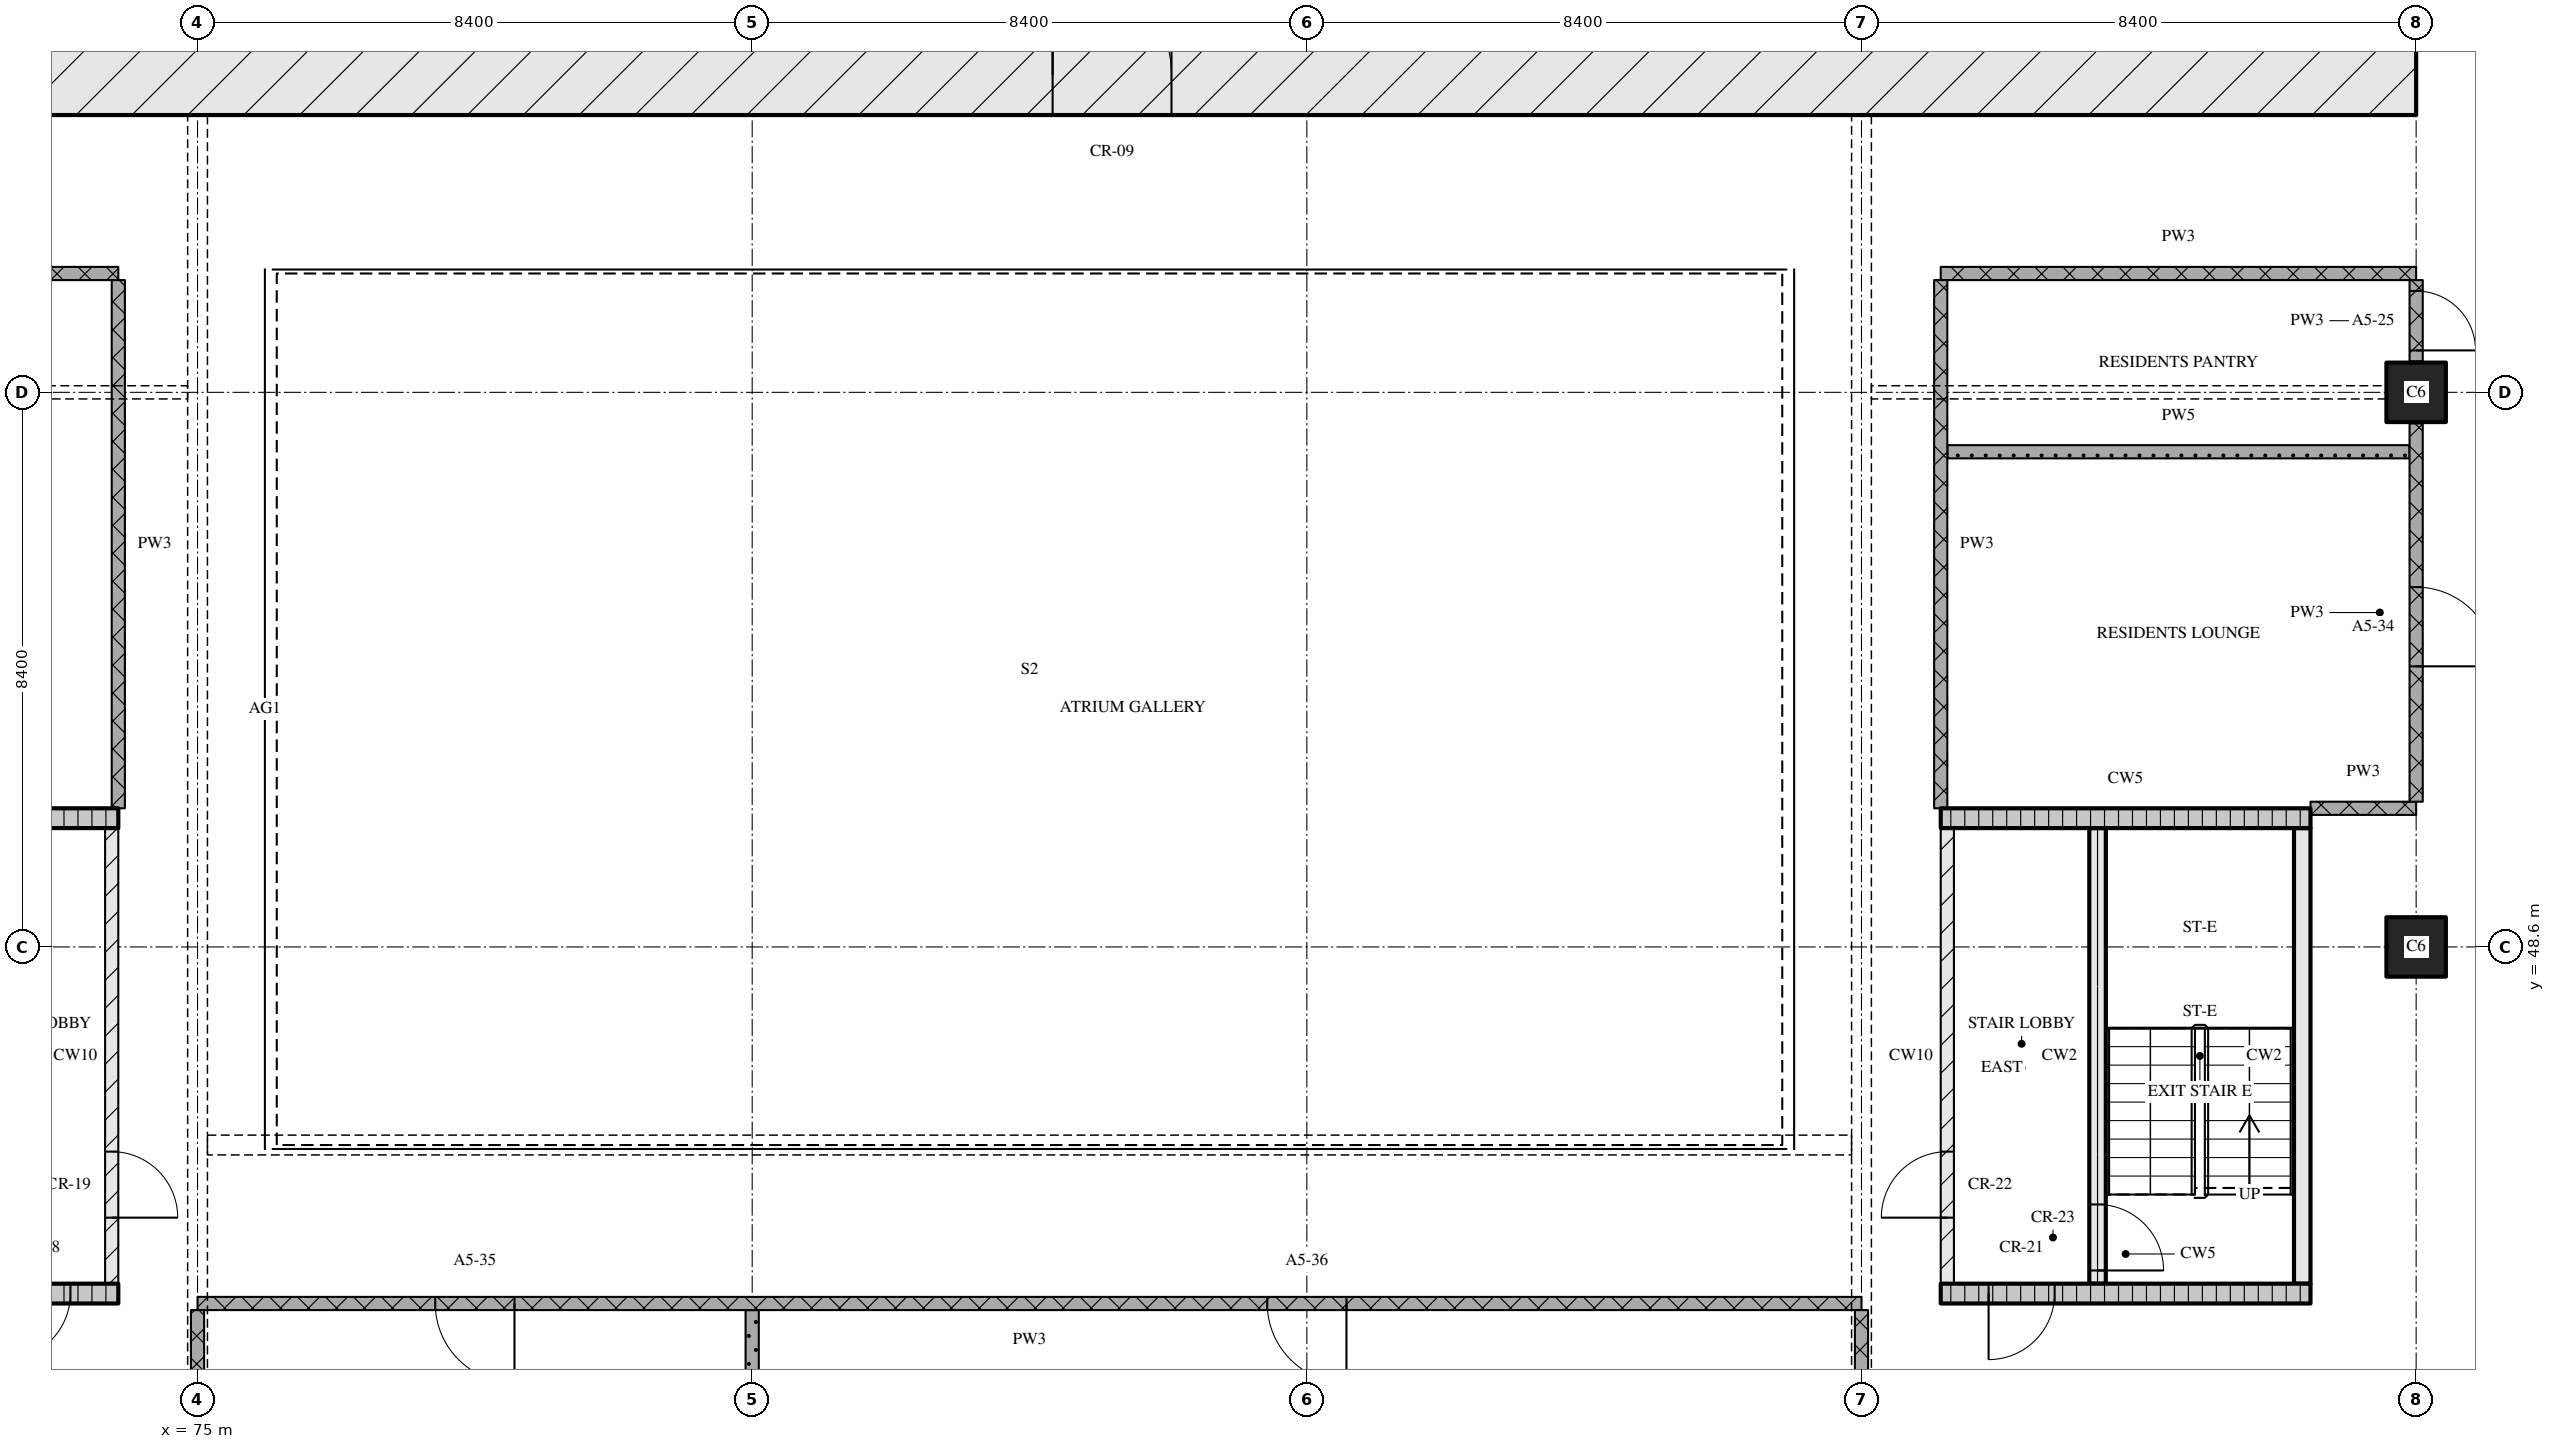
"""IFC4 building model, lengths in metres.
Left out: names, types, materials, properties, quantities, classifications, styles, units other than length and angle.
Written with IfcOpenShell. Run it as: python <this file> out.ifc"""

import sys

from ifc_helpers import new_model, si_unit, direction, frame, frame_2d, origin, origin_2d, place, context, subcontext, project, spatial, rectangle, extrude, element, fill, save


model = new_model("IFC4")
c1 = context("Model", 3, precision=1e-05, world=origin(), true_north=direction((0.0, 1.0)))
c2 = subcontext(c1, "Body", "Model", "MODEL_VIEW")
j1 = project(units=[si_unit("LENGTHUNIT", "METRE"), si_unit("PLANEANGLEUNIT", "RADIAN")], contexts=[c1])
p1 = place(None, origin())
s1 = spatial("IfcSite", under=j1, at=p1, CompositionType="ELEMENT")
p2 = place(p1, origin())
s2 = spatial("IfcBuilding", under=s1, at=p2, CompositionType="ELEMENT")
p3 = place(p2, frame((0.0, 0.0, 80.4)))
s3 = spatial("IfcBuildingStorey", under=s2, at=p3, CompositionType="ELEMENT", Elevation=80.4)
for number, where, z_axis, x_axis in (
    (1, (108.6, 48.6, 0.0), (0.0, 0.0, 1.0), (1.0, 0.0, 0.0)),
    (2, (108.6, 57.0, 0.0), (0.0, 0.0, 1.0), (1.0, 0.0, 0.0)),
):
    element("IfcColumn", number, at=place(p3, frame(where, z_axis=z_axis, x_axis=x_axis)), inside=s3, PredefinedType="COLUMN", context=c2, shape_type="SweptSolid", body=[
        extrude(rectangle(XDim=0.9, YDim=0.9, at=origin_2d()), origin(), (0.0, 0.0, 1.0), 3.6),
    ])
p4 = place(p3, frame((66.6, 61.8, 0.0), z_axis=(0.0, 0.0, 1.0), x_axis=(1.0, 0.0, 0.0)))
e3 = element("IfcWall", 3, at=p4, inside=s3, PredefinedType="SOLIDWALL", context=c2, shape_type="SweptSolid", body=[
    extrude(rectangle(XDim=42.0, YDim=1.2, at=frame_2d((21.0, 0.0))), origin(), (0.0, 0.0, 1.0), 3.3),
])
p5 = place(p4, frame((21.35, 0.0, 0.0)))
e4 = element("IfcOpeningElement", 4, at=p5, cuts=e3, PredefinedType="OPENING", context=c2, shape_type="SweptSolid", body=[
    extrude(rectangle(XDim=1.8, YDim=2.1, at=frame_2d((0.9, 1.05))), frame((0.0, 0.61, 0.0), z_axis=(0.0, -1.0, 0.0), x_axis=(1.0, 0.0, 0.0)), (0.0, 0.0, 1.0), 1.22),
])
p6 = place(p3, frame((68.2, 43.35, 0.0), z_axis=(0.0, 0.0, 1.0), x_axis=(1.0, 0.0, 0.0)))
e5 = element("IfcWall", 5, at=p6, inside=s3, PredefinedType="SOLIDWALL", context=c2, shape_type="SweptSolid", body=[
    extrude(rectangle(XDim=5.6, YDim=0.3, at=frame_2d((2.8, 0.0))), origin(), (0.0, 0.0, 1.0), 3.3),
])
p7 = place(p6, frame((3.875, 0.0, 0.0)))
e6 = element("IfcOpeningElement", 6, at=p7, cuts=e5, PredefinedType="OPENING", context=c2, shape_type="SweptSolid", body=[
    extrude(rectangle(XDim=1.0, YDim=2.1, at=frame_2d((0.5, 1.05))), frame((0.0, 0.16, 0.0), z_axis=(0.0, -1.0, 0.0), x_axis=(1.0, 0.0, 0.0)), (0.0, 0.0, 1.0), 0.32),
])
p8 = place(p3, frame((73.7, 43.5, 0.0), z_axis=(0.0, 0.0, 1.0), x_axis=(0.0, 1.0, 0.0)))
e7 = element("IfcWall", 7, at=p8, inside=s3, PredefinedType="PARTITIONING", context=c2, shape_type="SweptSolid", body=[
    extrude(rectangle(XDim=6.9, YDim=0.2, at=frame_2d((3.45, 0.0))), origin(), (0.0, 0.0, 1.0), 3.3),
])
p9 = place(p8, frame((1.0, 0.0, 0.0)))
e8 = element("IfcOpeningElement", 8, at=p9, cuts=e7, PredefinedType="OPENING", context=c2, shape_type="SweptSolid", body=[
    extrude(rectangle(XDim=1.0, YDim=2.1, at=frame_2d((0.5, 1.05))), frame((0.0, 0.11, 0.0), z_axis=(0.0, -1.0, 0.0), x_axis=(1.0, 0.0, 0.0)), (0.0, 0.0, 1.0), 0.22),
])
p10 = place(p3, frame((68.2, 50.55, 0.0), z_axis=(0.0, 0.0, 1.0), x_axis=(1.0, 0.0, 0.0)))
e9 = element("IfcWall", 9, at=p10, inside=s3, PredefinedType="SOLIDWALL", context=c2, shape_type="SweptSolid", body=[
    extrude(rectangle(XDim=5.6, YDim=0.3, at=frame_2d((2.8, 0.0))), origin(), (0.0, 0.0, 1.0), 3.3),
])
p11 = place(p3, frame((101.4, 43.35, 0.0), z_axis=(0.0, 0.0, 1.0), x_axis=(1.0, 0.0, 0.0)))
e10 = element("IfcWall", 10, at=p11, inside=s3, PredefinedType="SOLIDWALL", context=c2, shape_type="SweptSolid", body=[
    extrude(rectangle(XDim=5.6, YDim=0.3, at=frame_2d((2.8, 0.0))), origin(), (0.0, 0.0, 1.0), 3.3),
])
p12 = place(p11, frame((0.725, 0.0, 0.0)))
e11 = element("IfcOpeningElement", 11, at=p12, cuts=e10, PredefinedType="OPENING", context=c2, shape_type="SweptSolid", body=[
    extrude(rectangle(XDim=1.0, YDim=2.1, at=frame_2d((0.5, 1.05))), frame((0.0, 0.16, 0.0), z_axis=(0.0, -1.0, 0.0), x_axis=(1.0, 0.0, 0.0)), (0.0, 0.0, 1.0), 0.32),
])
p13 = place(p3, frame((101.5, 43.5, 0.0), z_axis=(0.0, 0.0, 1.0), x_axis=(0.0, 1.0, 0.0)))
e12 = element("IfcWall", 12, at=p13, inside=s3, PredefinedType="PARTITIONING", context=c2, shape_type="SweptSolid", body=[
    extrude(rectangle(XDim=6.9, YDim=0.2, at=frame_2d((3.45, 0.0))), origin(), (0.0, 0.0, 1.0), 3.3),
])
p14 = place(p13, frame((1.0, 0.0, 0.0)))
e13 = element("IfcOpeningElement", 13, at=p14, cuts=e12, PredefinedType="OPENING", context=c2, shape_type="SweptSolid", body=[
    extrude(rectangle(XDim=1.0, YDim=2.1, at=frame_2d((0.5, 1.05))), frame((0.0, 0.11, 0.0), z_axis=(0.0, -1.0, 0.0), x_axis=(1.0, 0.0, 0.0)), (0.0, 0.0, 1.0), 0.22),
])
p15 = place(p3, frame((103.775, 43.5, 0.0), z_axis=(0.0, 0.0, 1.0), x_axis=(0.0, 1.0, 0.0)))
e14 = element("IfcWall", 14, at=p15, inside=s3, PredefinedType="SOLIDWALL", context=c2, shape_type="SweptSolid", body=[
    extrude(rectangle(XDim=6.9, YDim=0.25, at=frame_2d((3.45, 0.0))), origin(), (0.0, 0.0, 1.0), 3.3),
])
p16 = place(p15, frame((0.2, 0.0, 0.0)))
e15 = element("IfcOpeningElement", 15, at=p16, cuts=e14, PredefinedType="OPENING", context=c2, shape_type="SweptSolid", body=[
    extrude(rectangle(XDim=1.0, YDim=2.1, at=frame_2d((0.5, 1.05))), frame((0.0, 0.135, 0.0), z_axis=(0.0, -1.0, 0.0), x_axis=(1.0, 0.0, 0.0)), (0.0, 0.0, 1.0), 0.27),
])
p17 = place(p3, frame((106.875, 43.5, 0.0), z_axis=(0.0, 0.0, 1.0), x_axis=(0.0, 1.0, 0.0)))
e16 = element("IfcWall", 16, at=p17, inside=s3, PredefinedType="SOLIDWALL", context=c2, shape_type="SweptSolid", body=[
    extrude(rectangle(XDim=6.9, YDim=0.25, at=frame_2d((3.45, 0.0))), origin(), (0.0, 0.0, 1.0), 3.3),
])
p18 = place(p3, frame((101.4, 50.55, 0.0), z_axis=(0.0, 0.0, 1.0), x_axis=(1.0, 0.0, 0.0)))
e17 = element("IfcWall", 17, at=p18, inside=s3, PredefinedType="SOLIDWALL", context=c2, shape_type="SweptSolid", body=[
    extrude(rectangle(XDim=5.6, YDim=0.3, at=frame_2d((2.8, 0.0))), origin(), (0.0, 0.0, 1.0), 3.3),
])
p19 = place(p3, frame((100.2, 43.2, 0.0), z_axis=(0.0, 0.0, 1.0), x_axis=(-1.0, 0.0, 0.0)))
e18 = element("IfcWall", 18, at=p19, inside=s3, PredefinedType="PARTITIONING", context=c2, shape_type="SweptSolid", body=[
    extrude(rectangle(XDim=25.2, YDim=0.2, at=frame_2d((12.6, 0.0))), origin(), (0.0, 0.0, 1.0), 3.3),
])
p20 = place(p19, frame((7.8, 0.0, 0.0)))
e19 = element("IfcOpeningElement", 19, at=p20, cuts=e18, PredefinedType="OPENING", context=c2, shape_type="SweptSolid", body=[
    extrude(rectangle(XDim=1.2, YDim=2.1, at=frame_2d((0.6, 1.05))), frame((0.0, 0.11, 0.0), z_axis=(0.0, -1.0, 0.0), x_axis=(1.0, 0.0, 0.0)), (0.0, 0.0, 1.0), 0.22),
])
p21 = place(p19, frame((20.4, 0.0, 0.0)))
e20 = element("IfcOpeningElement", 20, at=p21, cuts=e18, PredefinedType="OPENING", context=c2, shape_type="SweptSolid", body=[
    extrude(rectangle(XDim=1.2, YDim=2.1, at=frame_2d((0.6, 1.05))), frame((0.0, 0.11, 0.0), z_axis=(0.0, -1.0, 0.0), x_axis=(1.0, 0.0, 0.0)), (0.0, 0.0, 1.0), 0.22),
])
p22 = place(p3, frame((107.0, 50.7, 0.0), z_axis=(0.0, 0.0, 1.0), x_axis=(1.0, 0.0, 0.0)))
e21 = element("IfcWall", 21, at=p22, inside=s3, PredefinedType="PARTITIONING", context=c2, shape_type="SweptSolid", body=[
    extrude(rectangle(XDim=1.6, YDim=0.2, at=frame_2d((0.8, 0.0))), origin(), (0.0, 0.0, 1.0), 3.3),
])
p23 = place(p3, frame((101.5, 56.1, 0.0), z_axis=(0.0, 0.0, 1.0), x_axis=(1.0, 0.0, 0.0)))
e22 = element("IfcWall", 22, at=p23, inside=s3, PredefinedType="PARTITIONING", context=c2, shape_type="SweptSolid", body=[
    extrude(rectangle(XDim=7.0, YDim=0.2, at=frame_2d((3.5, 0.0))), origin(), (0.0, 0.0, 1.0), 3.3),
])
p24 = place(p3, frame((73.8, 58.8, 0.0), z_axis=(0.0, 0.0, 1.0), x_axis=(-1.0, 0.0, 0.0)))
e23 = element("IfcWall", 23, at=p24, inside=s3, PredefinedType="PARTITIONING", context=c2, shape_type="SweptSolid", body=[
    extrude(rectangle(XDim=7.2, YDim=0.2, at=frame_2d((3.6, 0.0))), origin(), (0.0, 0.0, 1.0), 3.3),
])
p25 = place(p24, frame((3.0, 0.0, 0.0)))
e24 = element("IfcOpeningElement", 24, at=p25, cuts=e23, PredefinedType="OPENING", context=c2, shape_type="SweptSolid", body=[
    extrude(rectangle(XDim=1.2, YDim=2.1, at=frame_2d((0.6, 1.05))), frame((0.0, 0.11, 0.0), z_axis=(0.0, -1.0, 0.0), x_axis=(1.0, 0.0, 0.0)), (0.0, 0.0, 1.0), 0.22),
])
p26 = place(p3, frame((101.4, 58.8, 0.0), z_axis=(0.0, 0.0, 1.0), x_axis=(1.0, 0.0, 0.0)))
e25 = element("IfcWall", 25, at=p26, inside=s3, PredefinedType="PARTITIONING", context=c2, shape_type="SweptSolid", body=[
    extrude(rectangle(XDim=7.2, YDim=0.2, at=frame_2d((3.6, 0.0))), origin(), (0.0, 0.0, 1.0), 3.3),
])
p27 = place(p3, frame((73.8, 58.7, 0.0), z_axis=(0.0, 0.0, 1.0), x_axis=(0.0, -1.0, 0.0)))
e26 = element("IfcWall", 26, at=p27, inside=s3, PredefinedType="PARTITIONING", context=c2, shape_type="SweptSolid", body=[
    extrude(rectangle(XDim=8.0, YDim=0.2, at=frame_2d((4.0, 0.0))), origin(), (0.0, 0.0, 1.0), 3.3),
])
p28 = place(p3, frame((75.0, 43.1, 0.0), z_axis=(0.0, 0.0, 1.0), x_axis=(0.0, -1.0, 0.0)))
e27 = element("IfcWall", 27, at=p28, inside=s3, PredefinedType="PARTITIONING", context=c2, shape_type="SweptSolid", body=[
    extrude(rectangle(XDim=2.2, YDim=0.2, at=frame_2d((1.1, 0.0))), origin(), (0.0, 0.0, 1.0), 2.41),
])
p29 = place(p3, frame((83.4, 43.1, 0.0), z_axis=(0.0, 0.0, 1.0), x_axis=(0.0, -1.0, 0.0)))
e28 = element("IfcWall", 28, at=p29, inside=s3, PredefinedType="PARTITIONING", context=c2, shape_type="SweptSolid", body=[
    extrude(rectangle(XDim=2.43, YDim=0.2, at=frame_2d((1.215, 0.0))), origin(), (0.0, 0.0, 1.0), 3.3),
])
p30 = place(p3, frame((100.2, 43.1, 0.0), z_axis=(0.0, 0.0, 1.0), x_axis=(0.0, -1.0, 0.0)))
e29 = element("IfcWall", 29, at=p30, inside=s3, PredefinedType="PARTITIONING", context=c2, shape_type="SweptSolid", body=[
    extrude(rectangle(XDim=2.2, YDim=0.2, at=frame_2d((1.1, 0.0))), origin(), (0.0, 0.0, 1.0), 2.41),
])
p31 = place(p3, frame((101.4, 58.7, 0.0), z_axis=(0.0, 0.0, 1.0), x_axis=(0.0, -1.0, 0.0)))
e30 = element("IfcWall", 30, at=p31, inside=s3, PredefinedType="PARTITIONING", context=c2, shape_type="SweptSolid", body=[
    extrude(rectangle(XDim=8.0, YDim=0.2, at=frame_2d((4.0, 0.0))), origin(), (0.0, 0.0, 1.0), 3.3),
])
p32 = place(p3, frame((108.6, 50.8, 0.0), z_axis=(0.0, 0.0, 1.0), x_axis=(0.0, 1.0, 0.0)))
e31 = element("IfcWall", 31, at=p32, inside=s3, PredefinedType="PARTITIONING", context=c2, shape_type="SweptSolid", body=[
    extrude(rectangle(XDim=5.73, YDim=0.2, at=frame_2d((2.865, 0.0))), origin(), (0.0, 0.0, 1.0), 3.3),
])
p33 = place(p32, frame((2.05, 0.0, 0.0)))
e32 = element("IfcOpeningElement", 32, at=p33, cuts=e31, PredefinedType="OPENING", context=c2, shape_type="SweptSolid", body=[
    extrude(rectangle(XDim=1.2, YDim=2.1, at=frame_2d((0.6, 1.05))), frame((0.0, 0.11, 0.0), z_axis=(0.0, -1.0, 0.0), x_axis=(1.0, 0.0, 0.0)), (0.0, 0.0, 1.0), 0.22),
])
p34 = place(p3, frame((108.6, 57.47, 0.0), z_axis=(0.0, 0.0, 1.0), x_axis=(0.0, 1.0, 0.0)))
e33 = element("IfcWall", 33, at=p34, inside=s3, PredefinedType="PARTITIONING", context=c2, shape_type="SweptSolid", body=[
    extrude(rectangle(XDim=1.23, YDim=0.2, at=frame_2d((0.615, 0.0))), origin(), (0.0, 0.0, 1.0), 3.3),
])
p35 = place(p34, frame((0.165, 0.0, 0.0)))
e34 = element("IfcOpeningElement", 34, at=p35, cuts=e33, PredefinedType="OPENING", context=c2, shape_type="SweptSolid", body=[
    extrude(rectangle(XDim=0.9, YDim=2.1, at=frame_2d((0.45, 1.05))), frame((0.0, 0.11, 0.0), z_axis=(0.0, -1.0, 0.0), x_axis=(1.0, 0.0, 0.0)), (0.0, 0.0, 1.0), 0.22),
])
p36 = place(p5, origin())
e35 = element("IfcDoor", 35, at=p36, inside=s3, OperationType="DOUBLE_DOOR_SINGLE_SWING", PredefinedType="DOOR", context=c2, shape_type="SweptSolid", body=[
    extrude(rectangle(XDim=1.8, YDim=2.1, at=frame_2d((0.9, 1.05))), frame((0.0, 0.025, 0.0), z_axis=(0.0, -1.0, 0.0), x_axis=(1.0, 0.0, 0.0)), (0.0, 0.0, 1.0), 0.05),
])
fill(e4, e35)
p37 = place(p7, origin())
e36 = element("IfcDoor", 36, at=p37, inside=s3, OperationType="SINGLE_SWING_RIGHT", PredefinedType="DOOR", context=c2, shape_type="SweptSolid", body=[
    extrude(rectangle(XDim=1.0, YDim=2.1, at=frame_2d((0.5, 1.05))), frame((0.0, 0.025, 0.0), z_axis=(0.0, -1.0, 0.0), x_axis=(1.0, 0.0, 0.0)), (0.0, 0.0, 1.0), 0.05),
])
fill(e6, e36)
p38 = place(p9, origin())
e37 = element("IfcDoor", 37, at=p38, inside=s3, OperationType="SINGLE_SWING_RIGHT", PredefinedType="DOOR", context=c2, shape_type="SweptSolid", body=[
    extrude(rectangle(XDim=1.0, YDim=2.1, at=frame_2d((0.5, 1.05))), frame((0.0, 0.025, 0.0), z_axis=(0.0, -1.0, 0.0), x_axis=(1.0, 0.0, 0.0)), (0.0, 0.0, 1.0), 0.05),
])
fill(e8, e37)
p39 = place(p12, origin())
e38 = element("IfcDoor", 38, at=p39, inside=s3, OperationType="SINGLE_SWING_RIGHT", PredefinedType="DOOR", context=c2, shape_type="SweptSolid", body=[
    extrude(rectangle(XDim=1.0, YDim=2.1, at=frame_2d((0.5, 1.05))), frame((0.0, 0.025, 0.0), z_axis=(0.0, -1.0, 0.0), x_axis=(1.0, 0.0, 0.0)), (0.0, 0.0, 1.0), 0.05),
])
fill(e11, e38)
p40 = place(p16, origin())
e39 = element("IfcDoor", 39, at=p40, inside=s3, OperationType="SINGLE_SWING_RIGHT", PredefinedType="DOOR", context=c2, shape_type="SweptSolid", body=[
    extrude(rectangle(XDim=1.0, YDim=2.1, at=frame_2d((0.5, 1.05))), frame((0.0, 0.025, 0.0), z_axis=(0.0, -1.0, 0.0), x_axis=(1.0, 0.0, 0.0)), (0.0, 0.0, 1.0), 0.05),
])
fill(e15, e39)
p41 = place(p14, origin())
e40 = element("IfcDoor", 40, at=p41, inside=s3, OperationType="SINGLE_SWING_LEFT", PredefinedType="DOOR", context=c2, shape_type="SweptSolid", body=[
    extrude(rectangle(XDim=1.0, YDim=2.1, at=frame_2d((0.5, 1.05))), frame((0.0, 0.025, 0.0), z_axis=(0.0, -1.0, 0.0), x_axis=(1.0, 0.0, 0.0)), (0.0, 0.0, 1.0), 0.05),
])
fill(e13, e40)
p42 = place(p20, origin())
e41 = element("IfcDoor", 41, at=p42, inside=s3, OperationType="SINGLE_SWING_LEFT", PredefinedType="DOOR", context=c2, shape_type="SweptSolid", body=[
    extrude(rectangle(XDim=1.2, YDim=2.1, at=frame_2d((0.6, 1.05))), frame((0.0, 0.025, 0.0), z_axis=(0.0, -1.0, 0.0), x_axis=(1.0, 0.0, 0.0)), (0.0, 0.0, 1.0), 0.05),
])
fill(e19, e41)
p43 = place(p21, origin())
e42 = element("IfcDoor", 42, at=p43, inside=s3, OperationType="SINGLE_SWING_LEFT", PredefinedType="DOOR", context=c2, shape_type="SweptSolid", body=[
    extrude(rectangle(XDim=1.2, YDim=2.1, at=frame_2d((0.6, 1.05))), frame((0.0, 0.025, 0.0), z_axis=(0.0, -1.0, 0.0), x_axis=(1.0, 0.0, 0.0)), (0.0, 0.0, 1.0), 0.05),
])
fill(e20, e42)
p44 = place(p33, origin())
e43 = element("IfcDoor", 43, at=p44, inside=s3, OperationType="SINGLE_SWING_RIGHT", PredefinedType="DOOR", context=c2, shape_type="SweptSolid", body=[
    extrude(rectangle(XDim=1.2, YDim=2.1, at=frame_2d((0.6, 1.05))), frame((0.0, 0.025, 0.0), z_axis=(0.0, -1.0, 0.0), x_axis=(1.0, 0.0, 0.0)), (0.0, 0.0, 1.0), 0.05),
])
fill(e32, e43)
p45 = place(p35, origin())
e44 = element("IfcDoor", 44, at=p45, inside=s3, OperationType="SINGLE_SWING_RIGHT", PredefinedType="DOOR", context=c2, shape_type="SweptSolid", body=[
    extrude(rectangle(XDim=0.9, YDim=2.1, at=frame_2d((0.45, 1.05))), frame((0.0, 0.025, 0.0), z_axis=(0.0, -1.0, 0.0), x_axis=(1.0, 0.0, 0.0)), (0.0, 0.0, 1.0), 0.05),
])
fill(e34, e44)
save(model, sys.argv[1])
